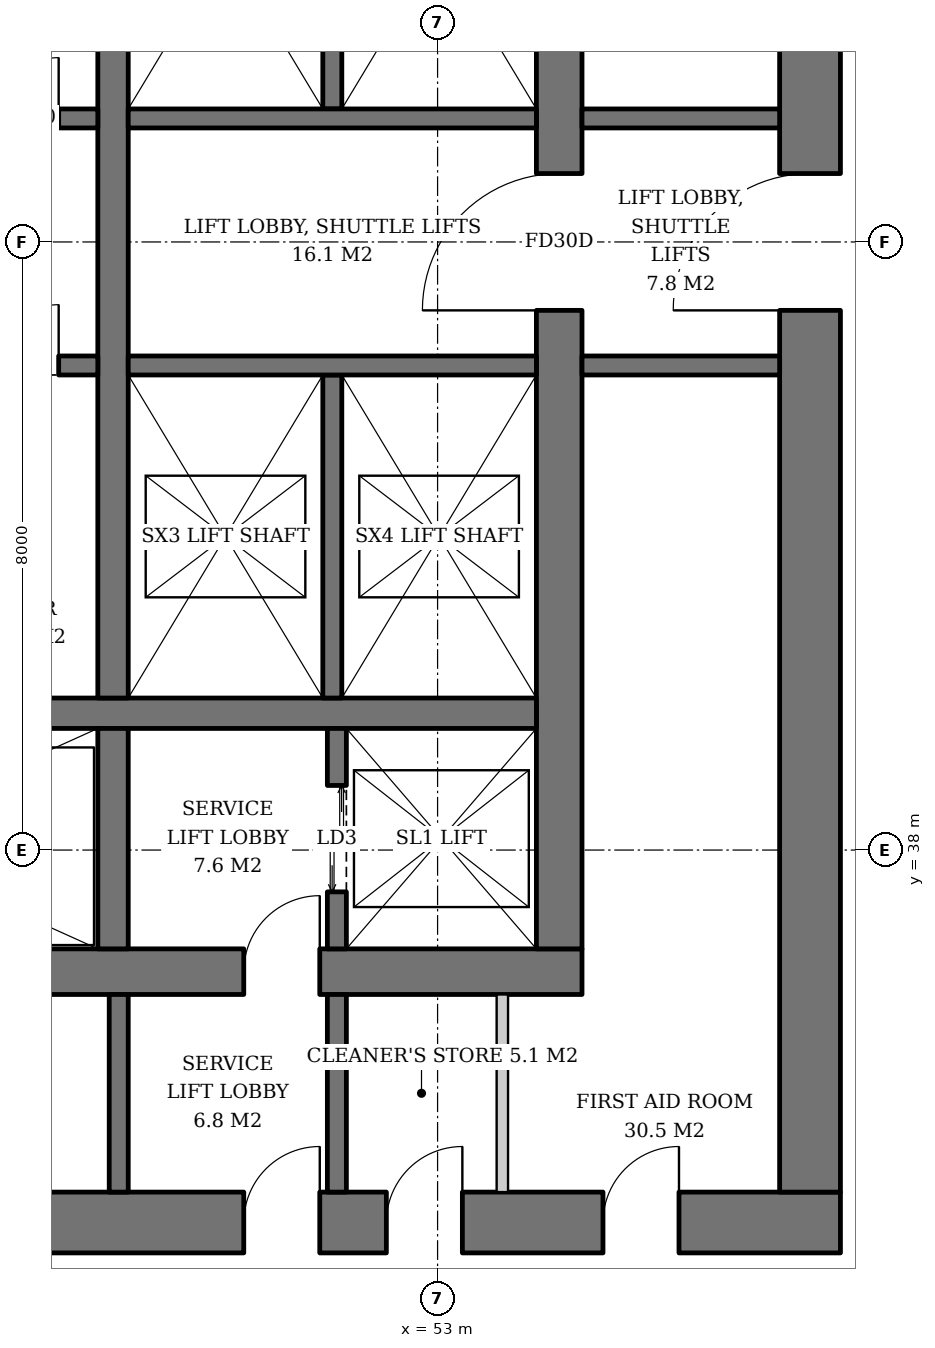
"""IFC4 building model, lengths in metres.
Left out: names, types, materials, properties, quantities, classifications, styles, units other than length and angle.
Written with IfcOpenShell. Run it as: python <this file> out.ifc"""

import sys

from ifc_helpers import new_model, si_unit, direction, frame, frame_2d, origin, place, context, subcontext, project, spatial, rectangle, extrude, element, fill, save


model = new_model("IFC4")
c1 = context("Model", 3, precision=1e-05, world=origin(), true_north=direction((0.0, 1.0)))
c2 = subcontext(c1, "Body", "Model", "MODEL_VIEW")
j1 = project(units=[si_unit("LENGTHUNIT", "METRE"), si_unit("PLANEANGLEUNIT", "RADIAN")], contexts=[c1])
p1 = place(None, origin())
s1 = spatial("IfcSite", under=j1, at=p1, CompositionType="ELEMENT")
p2 = place(p1, origin())
s2 = spatial("IfcBuilding", under=s1, at=p2, CompositionType="ELEMENT")
p3 = place(p2, frame((0.0, 0.0, 40.0)))
s3 = spatial("IfcBuildingStorey", under=s2, at=p3, CompositionType="ELEMENT", Elevation=40.0)
p4 = place(p3, frame((35.1, 36.4, 0.0), z_axis=(0.0, 0.0, 1.0), x_axis=(1.0, 0.0, 0.0)))
e1 = element("IfcWall", 1, at=p4, inside=s3, PredefinedType="SHEAR", context=c2, shape_type="SweptSolid", body=[
    extrude(rectangle(XDim=19.8, YDim=0.6, at=frame_2d((9.9, 0.0))), origin(), (0.0, 0.0, 1.0), 3.8),
])
p5 = place(p4, frame((3.9, 0.0, 0.0)))
e2 = element("IfcOpeningElement", 2, at=p5, cuts=e1, PredefinedType="OPENING", context=c2, shape_type="SweptSolid", body=[
    extrude(rectangle(XDim=1.0, YDim=2.1, at=frame_2d((0.5, 1.05))), frame((0.0, 0.31, 0.0), z_axis=(0.0, -1.0, 0.0), x_axis=(1.0, 0.0, 0.0)), (0.0, 0.0, 1.0), 0.62),
])
p6 = place(p4, frame((15.35, 0.0, 0.0)))
e3 = element("IfcOpeningElement", 3, at=p6, cuts=e1, PredefinedType="OPENING", context=c2, shape_type="SweptSolid", body=[
    extrude(rectangle(XDim=1.0, YDim=2.1, at=frame_2d((0.5, 1.05))), frame((0.0, 0.31, 0.0), z_axis=(0.0, -1.0, 0.0), x_axis=(1.0, 0.0, 0.0)), (0.0, 0.0, 1.0), 0.62),
])
p7 = place(p3, frame((54.6, 36.7, 0.0), z_axis=(0.0, 0.0, 1.0), x_axis=(0.0, 1.0, 0.0)))
e4 = element("IfcWall", 4, at=p7, inside=s3, PredefinedType="SHEAR", context=c2, shape_type="SweptSolid", body=[
    extrude(rectangle(XDim=18.6, YDim=0.6, at=frame_2d((9.3, 0.0))), origin(), (0.0, 0.0, 1.0), 3.8),
])
p8 = place(p7, frame((8.4, 0.0, 0.0)))
e5 = element("IfcOpeningElement", 5, at=p8, cuts=e4, PredefinedType="OPENING", context=c2, shape_type="SweptSolid", body=[
    extrude(rectangle(XDim=1.8, YDim=2.4, at=frame_2d((0.9, 1.2))), frame((0.0, 0.31, 0.0), z_axis=(0.0, -1.0, 0.0), x_axis=(1.0, 0.0, 0.0)), (0.0, 0.0, 1.0), 0.62),
])
p9 = place(p3, frame((31.7, 33.1, 0.0), z_axis=(0.0, 0.0, 1.0), x_axis=(1.0, 0.0, 0.0)))
e6 = element("IfcWall", 6, at=p9, inside=s3, PredefinedType="SHEAR", context=c2, shape_type="SweptSolid", body=[
    extrude(rectangle(XDim=26.6, YDim=0.8, at=frame_2d((13.3, 0.0))), origin(), (0.0, 0.0, 1.0), 3.8),
])
p10 = place(p9, frame((7.3, 0.0, 0.0)))
e7 = element("IfcOpeningElement", 7, at=p10, cuts=e6, PredefinedType="OPENING", context=c2, shape_type="SweptSolid", body=[
    extrude(rectangle(XDim=1.0, YDim=2.1, at=frame_2d((0.5, 1.05))), frame((0.0, 0.41, 0.0), z_axis=(0.0, -1.0, 0.0), x_axis=(1.0, 0.0, 0.0)), (0.0, 0.0, 1.0), 0.82),
])
p11 = place(p9, frame((18.75, 0.0, 0.0)))
e8 = element("IfcOpeningElement", 8, at=p11, cuts=e6, PredefinedType="OPENING", context=c2, shape_type="SweptSolid", body=[
    extrude(rectangle(XDim=1.0, YDim=2.1, at=frame_2d((0.5, 1.05))), frame((0.0, 0.41, 0.0), z_axis=(0.0, -1.0, 0.0), x_axis=(1.0, 0.0, 0.0)), (0.0, 0.0, 1.0), 0.82),
])
p12 = place(p9, frame((1.9, 0.0, 0.0)))
e9 = element("IfcOpeningElement", 9, at=p12, cuts=e6, PredefinedType="OPENING", context=c2, shape_type="SweptSolid", body=[
    extrude(rectangle(XDim=1.0, YDim=2.1, at=frame_2d((0.5, 1.05))), frame((0.0, 0.41, 0.0), z_axis=(0.0, -1.0, 0.0), x_axis=(1.0, 0.0, 0.0)), (0.0, 0.0, 1.0), 0.82),
])
p13 = place(p9, frame((4.725, 0.0, 0.0)))
e10 = element("IfcOpeningElement", 10, at=p13, cuts=e6, PredefinedType="OPENING", context=c2, shape_type="SweptSolid", body=[
    extrude(rectangle(XDim=1.0, YDim=2.1, at=frame_2d((0.5, 1.05))), frame((0.0, 0.41, 0.0), z_axis=(0.0, -1.0, 0.0), x_axis=(1.0, 0.0, 0.0)), (0.0, 0.0, 1.0), 0.82),
])
p14 = place(p9, frame((12.44, 0.0, 0.0)))
e11 = element("IfcOpeningElement", 11, at=p14, cuts=e6, PredefinedType="OPENING", context=c2, shape_type="SweptSolid", body=[
    extrude(rectangle(XDim=1.0, YDim=2.1, at=frame_2d((0.5, 1.05))), frame((0.0, 0.41, 0.0), z_axis=(0.0, -1.0, 0.0), x_axis=(1.0, 0.0, 0.0)), (0.0, 0.0, 1.0), 0.82),
])
p15 = place(p9, frame((20.626, 0.0, 0.0)))
e12 = element("IfcOpeningElement", 12, at=p15, cuts=e6, PredefinedType="OPENING", context=c2, shape_type="SweptSolid", body=[
    extrude(rectangle(XDim=1.0, YDim=2.1, at=frame_2d((0.5, 1.05))), frame((0.0, 0.41, 0.0), z_axis=(0.0, -1.0, 0.0), x_axis=(1.0, 0.0, 0.0)), (0.0, 0.0, 1.0), 0.82),
])
p16 = place(p9, frame((23.476, 0.0, 0.0)))
e13 = element("IfcOpeningElement", 13, at=p16, cuts=e6, PredefinedType="OPENING", context=c2, shape_type="SweptSolid", body=[
    extrude(rectangle(XDim=1.0, YDim=2.1, at=frame_2d((0.5, 1.05))), frame((0.0, 0.41, 0.0), z_axis=(0.0, -1.0, 0.0), x_axis=(1.0, 0.0, 0.0)), (0.0, 0.0, 1.0), 0.82),
])
p17 = place(p3, frame((57.9, 33.5, 0.0), z_axis=(0.0, 0.0, 1.0), x_axis=(0.0, 1.0, 0.0)))
e14 = element("IfcWall", 14, at=p17, inside=s3, PredefinedType="SHEAR", context=c2, shape_type="SweptSolid", body=[
    extrude(rectangle(XDim=25.0, YDim=0.8, at=frame_2d((12.5, 0.0))), origin(), (0.0, 0.0, 1.0), 3.8),
])
p18 = place(p17, frame((11.6, 0.0, 0.0)))
e15 = element("IfcOpeningElement", 15, at=p18, cuts=e14, PredefinedType="OPENING", context=c2, shape_type="SweptSolid", body=[
    extrude(rectangle(XDim=1.8, YDim=2.4, at=frame_2d((0.9, 1.2))), frame((0.0, 0.41, 0.0), z_axis=(0.0, -1.0, 0.0), x_axis=(1.0, 0.0, 0.0)), (0.0, 0.0, 1.0), 0.82),
])
p19 = place(p3, frame((35.7, 39.8, 0.0), z_axis=(0.0, 0.0, 1.0), x_axis=(1.0, 0.0, 0.0)))
e16 = element("IfcWall", 16, at=p19, inside=s3, PredefinedType="SHEAR", context=c2, shape_type="SweptSolid", body=[
    extrude(rectangle(XDim=18.6, YDim=0.4, at=frame_2d((9.3, 0.0))), origin(), (0.0, 0.0, 1.0), 3.8),
])
p20 = place(p3, frame((48.73, 36.7, 0.0), z_axis=(0.0, 0.0, 1.0), x_axis=(0.0, 1.0, 0.0)))
e17 = element("IfcWall", 17, at=p20, inside=s3, PredefinedType="SHEAR", context=c2, shape_type="SweptSolid", body=[
    extrude(rectangle(XDim=2.9, YDim=0.4, at=frame_2d((1.45, 0.0))), origin(), (0.0, 0.0, 1.0), 3.8),
])
p21 = place(p3, frame((48.73, 40.0, 0.0), z_axis=(0.0, 0.0, 1.0), x_axis=(0.0, 1.0, 0.0)))
e18 = element("IfcWall", 18, at=p21, inside=s3, PredefinedType="SHEAR", context=c2, shape_type="SweptSolid", body=[
    extrude(rectangle(XDim=12.0, YDim=0.4, at=frame_2d((6.0, 0.0))), origin(), (0.0, 0.0, 1.0), 3.8),
])
p22 = place(p3, frame((51.675, 36.7, 0.0), z_axis=(0.0, 0.0, 1.0), x_axis=(0.0, 1.0, 0.0)))
e19 = element("IfcWall", 19, at=p22, inside=s3, PredefinedType="SHEAR", context=c2, shape_type="SweptSolid", body=[
    extrude(rectangle(XDim=2.9, YDim=0.25, at=frame_2d((1.45, 0.0))), origin(), (0.0, 0.0, 1.0), 3.8),
])
p23 = place(p22, frame((0.75, 0.0, 0.0)))
e20 = element("IfcOpeningElement", 20, at=p23, cuts=e19, PredefinedType="OPENING", context=c2, shape_type="SweptSolid", body=[
    extrude(rectangle(XDim=1.4, YDim=2.4, at=frame_2d((0.7, 1.2))), frame((0.0, 0.135, 0.0), z_axis=(0.0, -1.0, 0.0), x_axis=(1.0, 0.0, 0.0)), (0.0, 0.0, 1.0), 0.27),
])
p24 = place(p3, frame((35.7, 47.625, 0.0), z_axis=(0.0, 0.0, 1.0), x_axis=(1.0, 0.0, 0.0)))
e21 = element("IfcWall", 21, at=p24, inside=s3, PredefinedType="SHEAR", context=c2, shape_type="SweptSolid", body=[
    extrude(rectangle(XDim=12.83, YDim=0.25, at=frame_2d((6.415, 0.0))), origin(), (0.0, 0.0, 1.0), 3.8),
])
p25 = place(p24, frame((0.7, 0.0, 0.0)))
e22 = element("IfcOpeningElement", 22, at=p25, cuts=e21, PredefinedType="OPENING", context=c2, shape_type="SweptSolid", body=[
    extrude(rectangle(XDim=1.1, YDim=2.2, at=frame_2d((0.55, 1.1))), frame((0.0, 0.135, 0.0), z_axis=(0.0, -1.0, 0.0), x_axis=(1.0, 0.0, 0.0)), (0.0, 0.0, 1.0), 0.27),
])
p26 = place(p24, frame((3.45, 0.0, 0.0)))
e23 = element("IfcOpeningElement", 23, at=p26, cuts=e21, PredefinedType="OPENING", context=c2, shape_type="SweptSolid", body=[
    extrude(rectangle(XDim=1.1, YDim=2.2, at=frame_2d((0.55, 1.1))), frame((0.0, 0.135, 0.0), z_axis=(0.0, -1.0, 0.0), x_axis=(1.0, 0.0, 0.0)), (0.0, 0.0, 1.0), 0.27),
])
p27 = place(p24, frame((6.2, 0.0, 0.0)))
e24 = element("IfcOpeningElement", 24, at=p27, cuts=e21, PredefinedType="OPENING", context=c2, shape_type="SweptSolid", body=[
    extrude(rectangle(XDim=1.1, YDim=2.2, at=frame_2d((0.55, 1.1))), frame((0.0, 0.135, 0.0), z_axis=(0.0, -1.0, 0.0), x_axis=(1.0, 0.0, 0.0)), (0.0, 0.0, 1.0), 0.27),
])
p28 = place(p24, frame((8.95, 0.0, 0.0)))
e25 = element("IfcOpeningElement", 25, at=p28, cuts=e21, PredefinedType="OPENING", context=c2, shape_type="SweptSolid", body=[
    extrude(rectangle(XDim=1.1, YDim=2.2, at=frame_2d((0.55, 1.1))), frame((0.0, 0.135, 0.0), z_axis=(0.0, -1.0, 0.0), x_axis=(1.0, 0.0, 0.0)), (0.0, 0.0, 1.0), 0.27),
])
p29 = place(p24, frame((11.515, 0.0, 0.0)))
e26 = element("IfcOpeningElement", 26, at=p29, cuts=e21, PredefinedType="OPENING", context=c2, shape_type="SweptSolid", body=[
    extrude(rectangle(XDim=0.8, YDim=2.0, at=frame_2d((0.4, 1.0))), frame((0.0, 0.135, 0.0), z_axis=(0.0, -1.0, 0.0), x_axis=(1.0, 0.0, 0.0)), (0.0, 0.0, 1.0), 0.27),
])
p30 = place(p3, frame((35.7, 44.375, 0.0), z_axis=(0.0, 0.0, 1.0), x_axis=(1.0, 0.0, 0.0)))
e27 = element("IfcWall", 27, at=p30, inside=s3, PredefinedType="SHEAR", context=c2, shape_type="SweptSolid", body=[
    extrude(rectangle(XDim=12.83, YDim=0.25, at=frame_2d((6.415, 0.0))), origin(), (0.0, 0.0, 1.0), 3.8),
])
p31 = place(p30, frame((0.7, 0.0, 0.0)))
e28 = element("IfcOpeningElement", 28, at=p31, cuts=e27, PredefinedType="OPENING", context=c2, shape_type="SweptSolid", body=[
    extrude(rectangle(XDim=1.1, YDim=2.2, at=frame_2d((0.55, 1.1))), frame((0.0, 0.135, 0.0), z_axis=(0.0, -1.0, 0.0), x_axis=(1.0, 0.0, 0.0)), (0.0, 0.0, 1.0), 0.27),
])
p32 = place(p30, frame((3.45, 0.0, 0.0)))
e29 = element("IfcOpeningElement", 29, at=p32, cuts=e27, PredefinedType="OPENING", context=c2, shape_type="SweptSolid", body=[
    extrude(rectangle(XDim=1.1, YDim=2.2, at=frame_2d((0.55, 1.1))), frame((0.0, 0.135, 0.0), z_axis=(0.0, -1.0, 0.0), x_axis=(1.0, 0.0, 0.0)), (0.0, 0.0, 1.0), 0.27),
])
p33 = place(p30, frame((6.2, 0.0, 0.0)))
e30 = element("IfcOpeningElement", 30, at=p33, cuts=e27, PredefinedType="OPENING", context=c2, shape_type="SweptSolid", body=[
    extrude(rectangle(XDim=1.1, YDim=2.2, at=frame_2d((0.55, 1.1))), frame((0.0, 0.135, 0.0), z_axis=(0.0, -1.0, 0.0), x_axis=(1.0, 0.0, 0.0)), (0.0, 0.0, 1.0), 0.27),
])
p34 = place(p30, frame((8.95, 0.0, 0.0)))
e31 = element("IfcOpeningElement", 31, at=p34, cuts=e27, PredefinedType="OPENING", context=c2, shape_type="SweptSolid", body=[
    extrude(rectangle(XDim=1.1, YDim=2.2, at=frame_2d((0.55, 1.1))), frame((0.0, 0.135, 0.0), z_axis=(0.0, -1.0, 0.0), x_axis=(1.0, 0.0, 0.0)), (0.0, 0.0, 1.0), 0.27),
])
p35 = place(p30, frame((11.515, 0.0, 0.0)))
e32 = element("IfcOpeningElement", 32, at=p35, cuts=e27, PredefinedType="OPENING", context=c2, shape_type="SweptSolid", body=[
    extrude(rectangle(XDim=0.8, YDim=2.0, at=frame_2d((0.4, 1.0))), frame((0.0, 0.135, 0.0), z_axis=(0.0, -1.0, 0.0), x_axis=(1.0, 0.0, 0.0)), (0.0, 0.0, 1.0), 0.27),
])
p36 = place(p3, frame((51.615, 47.75, 0.0), z_axis=(0.0, 0.0, 1.0), x_axis=(0.0, 1.0, 0.0)))
e33 = element("IfcWall", 33, at=p36, inside=s3, PredefinedType="SHEAR", context=c2, shape_type="SweptSolid", body=[
    extrude(rectangle(XDim=4.25, YDim=0.25, at=frame_2d((2.125, 0.0))), origin(), (0.0, 0.0, 1.0), 3.8),
])
p37 = place(p3, frame((48.93, 47.625, 0.0), z_axis=(0.0, 0.0, 1.0), x_axis=(1.0, 0.0, 0.0)))
e34 = element("IfcWall", 34, at=p37, inside=s3, PredefinedType="SHEAR", context=c2, shape_type="SweptSolid", body=[
    extrude(rectangle(XDim=5.37, YDim=0.25, at=frame_2d((2.685, 0.0))), origin(), (0.0, 0.0, 1.0), 3.8),
])
p38 = place(p3, frame((51.615, 44.25, 0.0), z_axis=(0.0, 0.0, 1.0), x_axis=(0.0, -1.0, 0.0)))
e35 = element("IfcWall", 35, at=p38, inside=s3, PredefinedType="SHEAR", context=c2, shape_type="SweptSolid", body=[
    extrude(rectangle(XDim=4.25, YDim=0.25, at=frame_2d((2.125, 0.0))), origin(), (0.0, 0.0, 1.0), 3.8),
])
p39 = place(p3, frame((48.93, 44.375, 0.0), z_axis=(0.0, 0.0, 1.0), x_axis=(1.0, 0.0, 0.0)))
e36 = element("IfcWall", 36, at=p39, inside=s3, PredefinedType="SHEAR", context=c2, shape_type="SweptSolid", body=[
    extrude(rectangle(XDim=5.37, YDim=0.25, at=frame_2d((2.685, 0.0))), origin(), (0.0, 0.0, 1.0), 3.8),
])
for number, where, z_axis, x_axis in (
    (37, (54.9, 44.375, 0.0), (0.0, 0.0, 1.0), (1.0, 0.0, 0.0)),
    (38, (54.9, 47.625, 0.0), (0.0, 0.0, 1.0), (1.0, 0.0, 0.0)),
    (39, (48.805, 33.5, 0.0), (0.0, 0.0, 1.0), (0.0, 1.0, 0.0)),
    (40, (51.675, 33.5, 0.0), (0.0, 0.0, 1.0), (0.0, 1.0, 0.0)),
):
    element("IfcWall", number, at=place(p3, frame(where, z_axis=z_axis, x_axis=x_axis)), inside=s3, PredefinedType="SOLIDWALL", context=c2, shape_type="SweptSolid", body=[
        extrude(rectangle(XDim=2.6, YDim=0.25, at=frame_2d((1.3, 0.0))), origin(), (0.0, 0.0, 1.0), 3.62),
    ])
p40 = place(p3, frame((53.852, 33.5, 0.0), z_axis=(0.0, 0.0, 1.0), x_axis=(0.0, 1.0, 0.0)))
e41 = element("IfcWall", 41, at=p40, inside=s3, PredefinedType="SOLIDWALL", context=c2, shape_type="SweptSolid", body=[
    extrude(rectangle(XDim=2.6, YDim=0.15, at=frame_2d((1.3, 0.0))), origin(), (0.0, 0.0, 1.0), 3.62),
])
p41 = place(p23, origin())
e42 = element("IfcDoor", 42, at=p41, inside=s3, OperationType="DOUBLE_DOOR_SLIDING", PredefinedType="DOOR", context=c2, shape_type="SweptSolid", body=[
    extrude(rectangle(XDim=1.4, YDim=2.4, at=frame_2d((0.7, 1.2))), frame((0.0, 0.025, 0.0), z_axis=(0.0, -1.0, 0.0), x_axis=(1.0, 0.0, 0.0)), (0.0, 0.0, 1.0), 0.05),
])
fill(e20, e42)
p42 = place(p29, origin())
e43 = element("IfcDoor", 43, at=p42, inside=s3, OperationType="SINGLE_SWING_RIGHT", PredefinedType="DOOR", context=c2, shape_type="SweptSolid", body=[
    extrude(rectangle(XDim=0.8, YDim=2.0, at=frame_2d((0.4, 1.0))), frame((0.0, 0.025, 0.0), z_axis=(0.0, -1.0, 0.0), x_axis=(1.0, 0.0, 0.0)), (0.0, 0.0, 1.0), 0.05),
])
fill(e26, e43)
p43 = place(p35, origin())
e44 = element("IfcDoor", 44, at=p43, inside=s3, OperationType="SINGLE_SWING_RIGHT", PredefinedType="DOOR", context=c2, shape_type="SweptSolid", body=[
    extrude(rectangle(XDim=0.8, YDim=2.0, at=frame_2d((0.4, 1.0))), frame((0.0, 0.025, 0.0), z_axis=(0.0, -1.0, 0.0), x_axis=(1.0, 0.0, 0.0)), (0.0, 0.0, 1.0), 0.05),
])
fill(e32, e44)
p44 = place(p8, origin())
e45 = element("IfcDoor", 45, at=p44, inside=s3, OperationType="DOUBLE_DOOR_SINGLE_SWING", PredefinedType="DOOR", context=c2, shape_type="SweptSolid", body=[
    extrude(rectangle(XDim=1.8, YDim=2.4, at=frame_2d((0.9, 1.2))), frame((0.0, 0.025, 0.0), z_axis=(0.0, -1.0, 0.0), x_axis=(1.0, 0.0, 0.0)), (0.0, 0.0, 1.0), 0.05),
])
fill(e5, e45)
p45 = place(p6, origin())
e46 = element("IfcDoor", 46, at=p45, inside=s3, OperationType="SINGLE_SWING_RIGHT", PredefinedType="DOOR", context=c2, shape_type="SweptSolid", body=[
    extrude(rectangle(XDim=1.0, YDim=2.1, at=frame_2d((0.5, 1.05))), frame((0.0, 0.025, 0.0), z_axis=(0.0, -1.0, 0.0), x_axis=(1.0, 0.0, 0.0)), (0.0, 0.0, 1.0), 0.05),
])
fill(e3, e46)
p46 = place(p18, origin())
e47 = element("IfcDoor", 47, at=p46, inside=s3, OperationType="DOUBLE_DOOR_SINGLE_SWING", PredefinedType="DOOR", context=c2, shape_type="SweptSolid", body=[
    extrude(rectangle(XDim=1.8, YDim=2.4, at=frame_2d((0.9, 1.2))), frame((0.0, 0.025, 0.0), z_axis=(0.0, -1.0, 0.0), x_axis=(1.0, 0.0, 0.0)), (0.0, 0.0, 1.0), 0.05),
])
fill(e15, e47)
p47 = place(p11, origin())
e48 = element("IfcDoor", 48, at=p47, inside=s3, OperationType="SINGLE_SWING_RIGHT", PredefinedType="DOOR", context=c2, shape_type="SweptSolid", body=[
    extrude(rectangle(XDim=1.0, YDim=2.1, at=frame_2d((0.5, 1.05))), frame((0.0, 0.025, 0.0), z_axis=(0.0, -1.0, 0.0), x_axis=(1.0, 0.0, 0.0)), (0.0, 0.0, 1.0), 0.05),
])
fill(e8, e48)
p48 = place(p15, origin())
e49 = element("IfcDoor", 49, at=p48, inside=s3, OperationType="SINGLE_SWING_RIGHT", PredefinedType="DOOR", context=c2, shape_type="SweptSolid", body=[
    extrude(rectangle(XDim=1.0, YDim=2.1, at=frame_2d((0.5, 1.05))), frame((0.0, 0.39, 0.0), z_axis=(0.0, -1.0, 0.0), x_axis=(1.0, 0.0, 0.0)), (0.0, 0.0, 1.0), 0.05),
])
fill(e12, e49)
p49 = place(p16, origin())
e50 = element("IfcDoor", 50, at=p49, inside=s3, OperationType="SINGLE_SWING_RIGHT", PredefinedType="DOOR", context=c2, shape_type="SweptSolid", body=[
    extrude(rectangle(XDim=1.0, YDim=2.1, at=frame_2d((0.5, 1.05))), frame((0.0, 0.39, 0.0), z_axis=(0.0, -1.0, 0.0), x_axis=(1.0, 0.0, 0.0)), (0.0, 0.0, 1.0), 0.05),
])
fill(e13, e50)
save(model, sys.argv[1])
